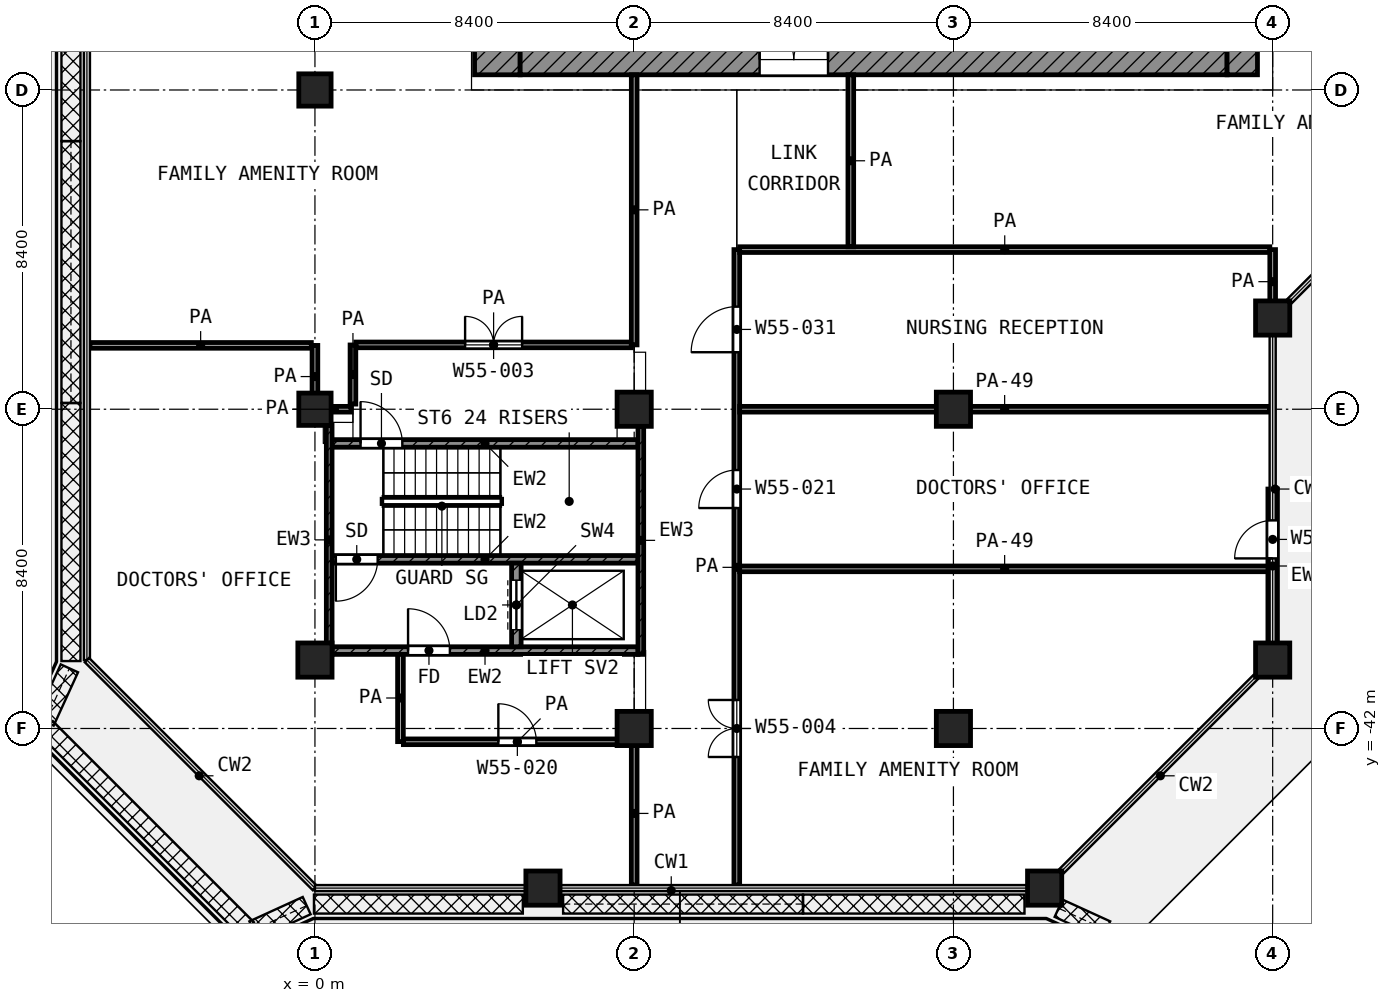
"""IFC4 building model, lengths in metres.
Left out: names, types, materials, properties, quantities, classifications, styles, units other than length and angle.
Written with IfcOpenShell. Run it as: python <this file> out.ifc"""

import sys

from ifc_helpers import new_model, si_unit, direction, frame, frame_2d, origin, origin_2d, place, context, subcontext, project, spatial, rectangle, extrude, element, fill, save


model = new_model("IFC4")
c1 = context("Model", 3, precision=1e-05, world=origin(), true_north=direction((0.0, 1.0)))
c2 = subcontext(c1, "Body", "Model", "MODEL_VIEW")
j1 = project(units=[si_unit("LENGTHUNIT", "METRE"), si_unit("PLANEANGLEUNIT", "RADIAN")], contexts=[c1])
p1 = place(None, origin())
s1 = spatial("IfcSite", under=j1, at=p1, CompositionType="ELEMENT")
p2 = place(p1, origin())
s2 = spatial("IfcBuilding", under=s1, at=p2, CompositionType="ELEMENT")
p3 = place(p2, frame((0.0, 0.0, 260.0)))
s3 = spatial("IfcBuildingStorey", under=s2, at=p3, CompositionType="ELEMENT", Elevation=260.0)
p4 = place(p3, frame((0.0, -25.2, 0.0), z_axis=(0.0, 0.0, 1.0), x_axis=(1.0, 0.0, 0.0)))
e1 = element("IfcColumn", 1, at=p4, inside=s3, PredefinedType="COLUMN", context=c2, shape_type="SweptSolid", body=[
    extrude(rectangle(XDim=0.85, YDim=0.85, at=origin_2d()), origin(), (0.0, 0.0, 1.0), 4.2),
])
p5 = place(p3, frame((25.2, -31.2, 0.0), z_axis=(0.0, 0.0, 1.0), x_axis=(1.0, 0.0, 0.0)))
e2 = element("IfcColumn", 2, at=p5, inside=s3, PredefinedType="COLUMN", context=c2, shape_type="SweptSolid", body=[
    extrude(rectangle(XDim=0.9, YDim=0.9, at=origin_2d()), origin(), (0.0, 0.0, 1.0), 4.2),
])
p6 = place(p3, frame((0.0, -33.6, 0.0), z_axis=(0.0, 0.0, 1.0), x_axis=(1.0, 0.0, 0.0)))
e3 = element("IfcColumn", 3, at=p6, inside=s3, PredefinedType="COLUMN", context=c2, shape_type="SweptSolid", body=[
    extrude(rectangle(XDim=0.85, YDim=0.85, at=origin_2d()), origin(), (0.0, 0.0, 1.0), 4.2),
])
for number, where, z_axis, x_axis in (
    (4, (8.4, -33.6, 0.0), (0.0, 0.0, 1.0), (1.0, 0.0, 0.0)),
    (5, (16.8, -33.6, 0.0), (0.0, 0.0, 1.0), (1.0, 0.0, 0.0)),
    (6, (0.0, -40.2, 0.0), (0.0, 0.0, 1.0), (1.0, 0.0, 0.0)),
    (7, (25.2, -40.2, 0.0), (0.0, 0.0, 1.0), (1.0, 0.0, 0.0)),
    (8, (8.4, -42.0, 0.0), (0.0, 0.0, 1.0), (1.0, 0.0, 0.0)),
    (9, (16.8, -42.0, 0.0), (0.0, 0.0, 1.0), (1.0, 0.0, 0.0)),
    (10, (6.0, -46.2, 0.0), (0.0, 0.0, 1.0), (1.0, 0.0, 0.0)),
    (11, (19.2, -46.2, 0.0), (0.0, 0.0, 1.0), (1.0, 0.0, 0.0)),
):
    element("IfcColumn", number, at=place(p3, frame(where, z_axis=z_axis, x_axis=x_axis)), inside=s3, PredefinedType="COLUMN", context=c2, shape_type="SweptSolid", body=[
        extrude(rectangle(XDim=0.9, YDim=0.9, at=origin_2d()), origin(), (0.0, 0.0, 1.0), 4.2),
    ])
p7 = place(p3, frame((25.2, -39.75, 0.0), z_axis=(0.0, 0.0, 1.0), x_axis=(0.0, 1.0, 0.0)))
e12 = element("IfcWall", 12, at=p7, inside=s3, PredefinedType="SOLIDWALL", context=c2, shape_type="SweptSolid", body=[
    extrude(rectangle(XDim=4.05, YDim=0.25, at=frame_2d((2.025, 0.0))), origin(), (0.0, 0.0, 1.0), 2.58),
])
p8 = place(p7, frame((2.225, 0.0, 0.0)))
e13 = element("IfcOpeningElement", 13, at=p8, cuts=e12, PredefinedType="OPENING", context=c2, shape_type="SweptSolid", body=[
    extrude(rectangle(XDim=1.0, YDim=2.1, at=frame_2d((0.5, 1.05))), frame((0.0, 0.135, 0.0), z_axis=(0.0, -1.0, 0.0), x_axis=(1.0, 0.0, 0.0)), (0.0, 0.0, 1.0), 0.27),
])
p9 = place(p3, frame((4.8, -24.8, 0.0), z_axis=(0.0, 0.0, 1.0), x_axis=(0.0, 1.0, 0.0)))
e14 = element("IfcWall", 14, at=p9, inside=s3, PredefinedType="SHEAR", context=c2, shape_type="SweptSolid", body=[
    extrude(rectangle(XDim=19.4, YDim=1.2, at=frame_2d((9.7, 0.0))), origin(), (0.0, 0.0, 1.0), 3.6),
])
p10 = place(p9, frame((11.25, 0.0, 0.0)))
e15 = element("IfcOpeningElement", 15, at=p10, cuts=e14, PredefinedType="OPENING", context=c2, shape_type="SweptSolid", body=[
    extrude(rectangle(XDim=1.1, YDim=2.1, at=frame_2d((0.55, 1.05))), frame((0.0, 0.61, 0.0), z_axis=(0.0, -1.0, 0.0), x_axis=(1.0, 0.0, 0.0)), (0.0, 0.0, 1.0), 1.22),
])
p11 = place(p9, frame((1.95, 0.0, 0.0)))
e16 = element("IfcOpeningElement", 16, at=p11, cuts=e14, PredefinedType="OPENING", context=c2, shape_type="SweptSolid", body=[
    extrude(rectangle(XDim=1.1, YDim=2.1, at=frame_2d((0.55, 1.05))), frame((0.0, 0.61, 0.0), z_axis=(0.0, -1.0, 0.0), x_axis=(1.0, 0.0, 0.0)), (0.0, 0.0, 1.0), 1.22),
])
p12 = place(p3, frame((5.4, -24.4, 0.0), z_axis=(0.0, 0.0, 1.0), x_axis=(1.0, 0.0, 0.0)))
e17 = element("IfcWall", 17, at=p12, inside=s3, PredefinedType="SHEAR", context=c2, shape_type="SweptSolid", body=[
    extrude(rectangle(XDim=18.6, YDim=0.8, at=frame_2d((9.3, 0.0))), origin(), (0.0, 0.0, 1.0), 3.6),
])
p13 = place(p12, frame((6.3, 0.0, 0.0)))
e18 = element("IfcOpeningElement", 18, at=p13, cuts=e17, PredefinedType="OPENING", context=c2, shape_type="SweptSolid", body=[
    extrude(rectangle(XDim=1.8, YDim=2.1, at=frame_2d((0.9, 1.05))), frame((0.0, 0.41, 0.0), z_axis=(0.0, -1.0, 0.0), x_axis=(1.0, 0.0, 0.0)), (0.0, 0.0, 1.0), 0.82),
])
p14 = place(p3, frame((24.4, -24.8, 0.0), z_axis=(0.0, 0.0, 1.0), x_axis=(0.0, 1.0, 0.0)))
e19 = element("IfcWall", 19, at=p14, inside=s3, PredefinedType="SHEAR", context=c2, shape_type="SweptSolid", body=[
    extrude(rectangle(XDim=0.8, YDim=0.8, at=frame_2d((0.4, 0.0))), origin(), (0.0, 0.0, 1.0), 3.6),
])
p15 = place(p3, frame((0.375, -40.05, 0.0), z_axis=(0.0, 0.0, 1.0), x_axis=(0.0, 1.0, 0.0)))
e20 = element("IfcWall", 20, at=p15, inside=s3, PredefinedType="SHEAR", context=c2, shape_type="SweptSolid", body=[
    extrude(rectangle(XDim=6.025, YDim=0.15, at=frame_2d((3.013, 0.0))), origin(), (0.0, 0.0, 1.0), 3.6),
])
p16 = place(p3, frame((8.575, -40.05, 0.0), z_axis=(0.0, 0.0, 1.0), x_axis=(0.0, 1.0, 0.0)))
e21 = element("IfcWall", 21, at=p16, inside=s3, PredefinedType="SHEAR", context=c2, shape_type="SweptSolid", body=[
    extrude(rectangle(XDim=6.0, YDim=0.15, at=frame_2d((3.0, 0.0))), origin(), (0.0, 0.0, 1.0), 3.6),
])
p17 = place(p3, frame((0.45, -34.5, 0.0), z_axis=(0.0, 0.0, 1.0), x_axis=(1.0, 0.0, 0.0)))
e22 = element("IfcWall", 22, at=p17, inside=s3, PredefinedType="SHEAR", context=c2, shape_type="SweptSolid", body=[
    extrude(rectangle(XDim=8.05, YDim=0.2, at=frame_2d((4.025, 0.0))), origin(), (0.0, 0.0, 1.0), 3.6),
])
p18 = place(p17, frame((0.75, 0.0, 0.0)))
e23 = element("IfcOpeningElement", 23, at=p18, cuts=e22, PredefinedType="OPENING", context=c2, shape_type="SweptSolid", body=[
    extrude(rectangle(XDim=1.1, YDim=2.1, at=frame_2d((0.55, 1.05))), frame((0.0, 0.11, 0.0), z_axis=(0.0, -1.0, 0.0), x_axis=(1.0, 0.0, 0.0)), (0.0, 0.0, 1.0), 0.22),
])
p19 = place(p3, frame((0.45, -37.55, 0.0), z_axis=(0.0, 0.0, 1.0), x_axis=(1.0, 0.0, 0.0)))
e24 = element("IfcWall", 24, at=p19, inside=s3, PredefinedType="SHEAR", context=c2, shape_type="SweptSolid", body=[
    extrude(rectangle(XDim=8.05, YDim=0.2, at=frame_2d((4.025, 0.0))), origin(), (0.0, 0.0, 1.0), 3.6),
])
p20 = place(p19, frame((0.1, 0.0, 0.0)))
e25 = element("IfcOpeningElement", 25, at=p20, cuts=e24, PredefinedType="OPENING", context=c2, shape_type="SweptSolid", body=[
    extrude(rectangle(XDim=1.1, YDim=2.1, at=frame_2d((0.55, 1.05))), frame((0.0, 0.11, 0.0), z_axis=(0.0, -1.0, 0.0), x_axis=(1.0, 0.0, 0.0)), (0.0, 0.0, 1.0), 0.22),
])
p21 = place(p3, frame((0.45, -39.95, 0.0), z_axis=(0.0, 0.0, 1.0), x_axis=(1.0, 0.0, 0.0)))
e26 = element("IfcWall", 26, at=p21, inside=s3, PredefinedType="SHEAR", context=c2, shape_type="SweptSolid", body=[
    extrude(rectangle(XDim=8.05, YDim=0.2, at=frame_2d((4.025, 0.0))), origin(), (0.0, 0.0, 1.0), 3.6),
])
p22 = place(p21, frame((2.0, 0.0, 0.0)))
e27 = element("IfcOpeningElement", 27, at=p22, cuts=e26, PredefinedType="OPENING", context=c2, shape_type="SweptSolid", body=[
    extrude(rectangle(XDim=1.1, YDim=2.1, at=frame_2d((0.55, 1.05))), frame((0.0, 0.11, 0.0), z_axis=(0.0, -1.0, 0.0), x_axis=(1.0, 0.0, 0.0)), (0.0, 0.0, 1.0), 0.22),
])
p23 = place(p3, frame((5.3, -39.85, 0.0), z_axis=(0.0, 0.0, 1.0), x_axis=(0.0, 1.0, 0.0)))
e28 = element("IfcWall", 28, at=p23, inside=s3, PredefinedType="SHEAR", context=c2, shape_type="SweptSolid", body=[
    extrude(rectangle(XDim=2.2, YDim=0.25, at=frame_2d((1.1, 0.0))), origin(), (0.0, 0.0, 1.0), 3.6),
])
p24 = place(p23, frame((0.45, 0.0, 0.0)))
e29 = element("IfcOpeningElement", 29, at=p24, cuts=e28, PredefinedType="OPENING", context=c2, shape_type="SweptSolid", body=[
    extrude(rectangle(XDim=1.3, YDim=2.1, at=frame_2d((0.65, 1.05))), frame((0.0, 0.135, 0.0), z_axis=(0.0, -1.0, 0.0), x_axis=(1.0, 0.0, 0.0)), (0.0, 0.0, 1.0), 0.27),
])
p25 = place(p3, frame((2.327, -42.35, 0.0), z_axis=(0.0, 0.0, 1.0), x_axis=(1.0, 0.0, 0.0)))
e30 = element("IfcWall", 30, at=p25, inside=s3, PredefinedType="PARTITIONING", context=c2, shape_type="SweptSolid", body=[
    extrude(rectangle(XDim=5.998, YDim=0.15, at=frame_2d((2.999, 0.0))), origin(), (0.0, 0.0, 1.0), 3.6),
])
p26 = place(p25, frame((2.499, 0.0, 0.0)))
e31 = element("IfcOpeningElement", 31, at=p26, cuts=e30, PredefinedType="OPENING", context=c2, shape_type="SweptSolid", body=[
    extrude(rectangle(XDim=1.0, YDim=2.1, at=frame_2d((0.5, 1.05))), frame((0.0, 0.085, 0.0), z_axis=(0.0, -1.0, 0.0), x_axis=(1.0, 0.0, 0.0)), (0.0, 0.0, 1.0), 0.17),
])
p27 = place(p3, frame((11.175, -37.8, 0.0), z_axis=(0.0, 0.0, 1.0), x_axis=(1.0, 0.0, 0.0)))
e32 = element("IfcWall", 32, at=p27, inside=s3, PredefinedType="PARTITIONING", context=c2, shape_type="SweptSolid", body=[
    extrude(rectangle(XDim=13.945, YDim=0.15, at=frame_2d((6.973, 0.0))), origin(), (0.0, 0.0, 1.0), 2.7),
])
p28 = place(p3, frame((0.075, -33.6, 0.0), z_axis=(0.0, 0.0, 1.0), x_axis=(1.0, 0.0, 0.0)))
e33 = element("IfcWall", 33, at=p28, inside=s3, PredefinedType="PARTITIONING", context=c2, shape_type="SweptSolid", body=[
    extrude(rectangle(XDim=0.875, YDim=0.15, at=frame_2d((0.438, 0.0))), origin(), (0.0, 0.0, 1.0), 3.6),
])
p29 = place(p3, frame((11.175, -33.6, 0.0), z_axis=(0.0, 0.0, 1.0), x_axis=(1.0, 0.0, 0.0)))
e34 = element("IfcWall", 34, at=p29, inside=s3, PredefinedType="PARTITIONING", context=c2, shape_type="SweptSolid", body=[
    extrude(rectangle(XDim=13.945, YDim=0.15, at=frame_2d((6.973, 0.0))), origin(), (0.0, 0.0, 1.0), 2.7),
])
p30 = place(p3, frame((-5.92, -31.92, 0.0), z_axis=(0.0, 0.0, 1.0), x_axis=(1.0, 0.0, 0.0)))
e35 = element("IfcWall", 35, at=p30, inside=s3, PredefinedType="PARTITIONING", context=c2, shape_type="SweptSolid", body=[
    extrude(rectangle(XDim=5.825, YDim=0.15, at=frame_2d((2.913, 0.0))), origin(), (0.0, 0.0, 1.0), 3.6),
])
p31 = place(p3, frame((1.077, -31.907, 0.0), z_axis=(0.0, 0.0, 1.0), x_axis=(1.0, 0.0, 0.0)))
e36 = element("IfcWall", 36, at=p31, inside=s3, PredefinedType="PARTITIONING", context=c2, shape_type="SweptSolid", body=[
    extrude(rectangle(XDim=7.248, YDim=0.15, at=frame_2d((3.624, 0.0))), origin(), (0.0, 0.0, 1.0), 3.6),
])
p32 = place(p31, frame((2.874, 0.0, 0.0)))
e37 = element("IfcOpeningElement", 37, at=p32, cuts=e36, PredefinedType="OPENING", context=c2, shape_type="SweptSolid", body=[
    extrude(rectangle(XDim=1.5, YDim=2.1, at=frame_2d((0.75, 1.05))), frame((0.0, 0.085, 0.0), z_axis=(0.0, -1.0, 0.0), x_axis=(1.0, 0.0, 0.0)), (0.0, 0.0, 1.0), 0.17),
])
p33 = place(p3, frame((11.175, -29.4, 0.0), z_axis=(0.0, 0.0, 1.0), x_axis=(1.0, 0.0, 0.0)))
e38 = element("IfcWall", 38, at=p33, inside=s3, PredefinedType="PARTITIONING", context=c2, shape_type="SweptSolid", body=[
    extrude(rectangle(XDim=13.95, YDim=0.15, at=frame_2d((6.975, 0.0))), origin(), (0.0, 0.0, 1.0), 3.6),
])
p34 = place(p3, frame((0.0, -33.56, 0.0), z_axis=(0.0, 0.0, 1.0), x_axis=(0.0, 1.0, 0.0)))
e39 = element("IfcWall", 39, at=p34, inside=s3, PredefinedType="PARTITIONING", context=c2, shape_type="SweptSolid", body=[
    extrude(rectangle(XDim=1.639, YDim=0.15, at=frame_2d((0.82, 0.0))), origin(), (0.0, 0.0, 1.0), 3.6),
])
p35 = place(p3, frame((1.0, -33.465, 0.0), z_axis=(0.0, 0.0, 1.0), x_axis=(0.0, 1.0, 0.0)))
e40 = element("IfcWall", 40, at=p35, inside=s3, PredefinedType="PARTITIONING", context=c2, shape_type="SweptSolid", body=[
    extrude(rectangle(XDim=1.556, YDim=0.15, at=frame_2d((0.778, 0.0))), origin(), (0.0, 0.0, 1.0), 3.6),
])
p36 = place(p3, frame((2.25, -42.346, 0.0), z_axis=(0.0, 0.0, 1.0), x_axis=(0.0, 1.0, 0.0)))
e41 = element("IfcWall", 41, at=p36, inside=s3, PredefinedType="PARTITIONING", context=c2, shape_type="SweptSolid", body=[
    extrude(rectangle(XDim=2.296, YDim=0.15, at=frame_2d((1.148, 0.0))), origin(), (0.0, 0.0, 1.0), 3.6),
])
p37 = place(p3, frame((8.4, -46.12, 0.0), z_axis=(0.0, 0.0, 1.0), x_axis=(0.0, 1.0, 0.0)))
e42 = element("IfcWall", 42, at=p37, inside=s3, PredefinedType="PARTITIONING", context=c2, shape_type="SweptSolid", body=[
    extrude(rectangle(XDim=3.77, YDim=0.15, at=frame_2d((1.885, 0.0))), origin(), (0.0, 0.0, 1.0), 3.6),
])
p38 = place(p3, frame((8.4, -31.907, 0.0), z_axis=(0.0, 0.0, 1.0), x_axis=(0.0, 1.0, 0.0)))
e43 = element("IfcWall", 43, at=p38, inside=s3, PredefinedType="PARTITIONING", context=c2, shape_type="SweptSolid", body=[
    extrude(rectangle(XDim=7.107, YDim=0.15, at=frame_2d((3.553, 0.0))), origin(), (0.0, 0.0, 1.0), 3.6),
])
p39 = place(p3, frame((11.1, -46.12, 0.0), z_axis=(0.0, 0.0, 1.0), x_axis=(0.0, 1.0, 0.0)))
e44 = element("IfcWall", 44, at=p39, inside=s3, PredefinedType="PARTITIONING", context=c2, shape_type="SweptSolid", body=[
    extrude(rectangle(XDim=16.72, YDim=0.15, at=frame_2d((8.36, 0.0))), origin(), (0.0, 0.0, 1.0), 3.6),
])
p40 = place(p39, frame((14.02, 0.0, 0.0)))
e45 = element("IfcOpeningElement", 45, at=p40, cuts=e44, PredefinedType="OPENING", context=c2, shape_type="SweptSolid", body=[
    extrude(rectangle(XDim=1.2, YDim=2.1, at=frame_2d((0.6, 1.05))), frame((0.0, 0.085, 0.0), z_axis=(0.0, -1.0, 0.0), x_axis=(1.0, 0.0, 0.0)), (0.0, 0.0, 1.0), 0.17),
])
p41 = place(p39, frame((9.92, 0.0, 0.0)))
e46 = element("IfcOpeningElement", 46, at=p41, cuts=e44, PredefinedType="OPENING", context=c2, shape_type="SweptSolid", body=[
    extrude(rectangle(XDim=1.0, YDim=2.1, at=frame_2d((0.5, 1.05))), frame((0.0, 0.085, 0.0), z_axis=(0.0, -1.0, 0.0), x_axis=(1.0, 0.0, 0.0)), (0.0, 0.0, 1.0), 0.17),
])
p42 = place(p39, frame((3.37, 0.0, 0.0)))
e47 = element("IfcOpeningElement", 47, at=p42, cuts=e44, PredefinedType="OPENING", context=c2, shape_type="SweptSolid", body=[
    extrude(rectangle(XDim=1.5, YDim=2.1, at=frame_2d((0.75, 1.05))), frame((0.0, 0.085, 0.0), z_axis=(0.0, -1.0, 0.0), x_axis=(1.0, 0.0, 0.0)), (0.0, 0.0, 1.0), 0.17),
])
p43 = place(p3, frame((14.1, -29.325, 0.0), z_axis=(0.0, 0.0, 1.0), x_axis=(0.0, 1.0, 0.0)))
e48 = element("IfcWall", 48, at=p43, inside=s3, PredefinedType="PARTITIONING", context=c2, shape_type="SweptSolid", body=[
    extrude(rectangle(XDim=4.525, YDim=0.15, at=frame_2d((2.262, 0.0))), origin(), (0.0, 0.0, 1.0), 3.6),
])
p44 = place(p3, frame((25.2, -31.087, 0.0), z_axis=(0.0, 0.0, 1.0), x_axis=(0.0, 1.0, 0.0)))
e49 = element("IfcWall", 49, at=p44, inside=s3, PredefinedType="PARTITIONING", context=c2, shape_type="SweptSolid", body=[
    extrude(rectangle(XDim=1.687, YDim=0.15, at=frame_2d((0.844, 0.0))), origin(), (0.0, 0.0, 1.0), 3.6),
])
p45 = place(p8, origin())
e50 = element("IfcDoor", 50, at=p45, inside=s3, OperationType="SINGLE_SWING_LEFT", PredefinedType="DOOR", context=c2, shape_type="SweptSolid", body=[
    extrude(rectangle(XDim=1.0, YDim=2.1, at=frame_2d((0.5, 1.05))), frame((0.0, 0.025, 0.0), z_axis=(0.0, -1.0, 0.0), x_axis=(1.0, 0.0, 0.0)), (0.0, 0.0, 1.0), 0.05),
])
fill(e13, e50)
p46 = place(p13, origin())
e51 = element("IfcDoor", 51, at=p46, inside=s3, OperationType="DOUBLE_DOOR_SINGLE_SWING", PredefinedType="DOOR", context=c2, shape_type="SweptSolid", body=[
    extrude(rectangle(XDim=1.8, YDim=2.1, at=frame_2d((0.9, 1.05))), frame((0.0, 0.025, 0.0), z_axis=(0.0, -1.0, 0.0), x_axis=(1.0, 0.0, 0.0)), (0.0, 0.0, 1.0), 0.05),
])
fill(e18, e51)
p47 = place(p18, origin())
e52 = element("IfcDoor", 52, at=p47, inside=s3, OperationType="SINGLE_SWING_LEFT", PredefinedType="DOOR", context=c2, shape_type="SweptSolid", body=[
    extrude(rectangle(XDim=1.1, YDim=2.1, at=frame_2d((0.55, 1.05))), frame((0.0, 0.025, 0.0), z_axis=(0.0, -1.0, 0.0), x_axis=(1.0, 0.0, 0.0)), (0.0, 0.0, 1.0), 0.05),
])
fill(e23, e52)
p48 = place(p20, frame((1.1, 0.0, 0.0), z_axis=(0.0, 0.0, 1.0), x_axis=(-1.0, 0.0, 0.0)))
e53 = element("IfcDoor", 53, at=p48, inside=s3, OperationType="SINGLE_SWING_LEFT", PredefinedType="DOOR", context=c2, shape_type="SweptSolid", body=[
    extrude(rectangle(XDim=1.1, YDim=2.1, at=frame_2d((0.55, 1.05))), frame((0.0, 0.025, 0.0), z_axis=(0.0, -1.0, 0.0), x_axis=(1.0, 0.0, 0.0)), (0.0, 0.0, 1.0), 0.05),
])
fill(e25, e53)
p49 = place(p24, origin())
e54 = element("IfcDoor", 54, at=p49, inside=s3, OperationType="DOUBLE_DOOR_SLIDING", PredefinedType="DOOR", context=c2, shape_type="SweptSolid", body=[
    extrude(rectangle(XDim=1.3, YDim=2.1, at=frame_2d((0.65, 1.05))), frame((0.0, 0.025, 0.0), z_axis=(0.0, -1.0, 0.0), x_axis=(1.0, 0.0, 0.0)), (0.0, 0.0, 1.0), 0.05),
])
fill(e29, e54)
p50 = place(p22, origin())
e55 = element("IfcDoor", 55, at=p50, inside=s3, OperationType="SINGLE_SWING_LEFT", PredefinedType="DOOR", context=c2, shape_type="SweptSolid", body=[
    extrude(rectangle(XDim=1.1, YDim=2.1, at=frame_2d((0.55, 1.05))), frame((0.0, 0.025, 0.0), z_axis=(0.0, -1.0, 0.0), x_axis=(1.0, 0.0, 0.0)), (0.0, 0.0, 1.0), 0.05),
])
fill(e27, e55)
p51 = place(p32, origin())
e56 = element("IfcDoor", 56, at=p51, inside=s3, OperationType="DOUBLE_DOOR_SINGLE_SWING", PredefinedType="DOOR", context=c2, shape_type="SweptSolid", body=[
    extrude(rectangle(XDim=1.5, YDim=2.1, at=frame_2d((0.75, 1.05))), frame((0.0, 0.025, 0.0), z_axis=(0.0, -1.0, 0.0), x_axis=(1.0, 0.0, 0.0)), (0.0, 0.0, 1.0), 0.05),
])
fill(e37, e56)
p52 = place(p26, origin())
e57 = element("IfcDoor", 57, at=p52, inside=s3, OperationType="SINGLE_SWING_LEFT", PredefinedType="DOOR", context=c2, shape_type="SweptSolid", body=[
    extrude(rectangle(XDim=1.0, YDim=2.1, at=frame_2d((0.5, 1.05))), frame((0.0, 0.025, 0.0), z_axis=(0.0, -1.0, 0.0), x_axis=(1.0, 0.0, 0.0)), (0.0, 0.0, 1.0), 0.05),
])
fill(e31, e57)
p53 = place(p40, origin())
e58 = element("IfcDoor", 58, at=p53, inside=s3, OperationType="SINGLE_SWING_LEFT", PredefinedType="DOOR", context=c2, shape_type="SweptSolid", body=[
    extrude(rectangle(XDim=1.2, YDim=2.1, at=frame_2d((0.6, 1.05))), frame((0.0, 0.025, 0.0), z_axis=(0.0, -1.0, 0.0), x_axis=(1.0, 0.0, 0.0)), (0.0, 0.0, 1.0), 0.05),
])
fill(e45, e58)
p54 = place(p41, origin())
e59 = element("IfcDoor", 59, at=p54, inside=s3, OperationType="SINGLE_SWING_LEFT", PredefinedType="DOOR", context=c2, shape_type="SweptSolid", body=[
    extrude(rectangle(XDim=1.0, YDim=2.1, at=frame_2d((0.5, 1.05))), frame((0.0, 0.025, 0.0), z_axis=(0.0, -1.0, 0.0), x_axis=(1.0, 0.0, 0.0)), (0.0, 0.0, 1.0), 0.05),
])
fill(e46, e59)
p55 = place(p42, origin())
e60 = element("IfcDoor", 60, at=p55, inside=s3, OperationType="DOUBLE_DOOR_SINGLE_SWING", PredefinedType="DOOR", context=c2, shape_type="SweptSolid", body=[
    extrude(rectangle(XDim=1.5, YDim=2.1, at=frame_2d((0.75, 1.05))), frame((0.0, 0.025, 0.0), z_axis=(0.0, -1.0, 0.0), x_axis=(1.0, 0.0, 0.0)), (0.0, 0.0, 1.0), 0.05),
])
fill(e47, e60)
save(model, sys.argv[1])
